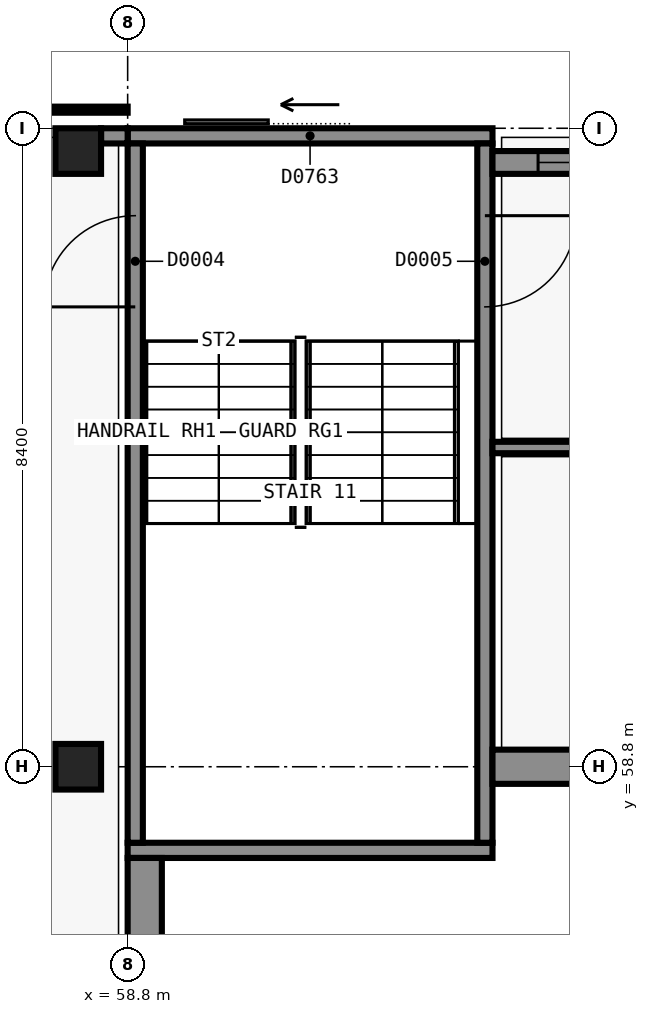
"""IFC4 building model, lengths in metres.
Left out: names, types, materials, properties, quantities, classifications, styles, units other than length and angle.
Written with IfcOpenShell. Run it as: python <this file> out.ifc"""

import sys

from ifc_helpers import new_model, si_unit, direction, frame, frame_2d, origin, origin_2d, place, context, subcontext, project, spatial, rectangle, extrude, element, fill, save


model = new_model("IFC4")
c1 = context("Model", 3, precision=1e-05, world=origin(), true_north=direction((0.0, 1.0)))
c2 = subcontext(c1, "Body", "Model", "MODEL_VIEW")
j1 = project(units=[si_unit("LENGTHUNIT", "METRE"), si_unit("PLANEANGLEUNIT", "RADIAN")], contexts=[c1])
p1 = place(None, origin())
s1 = spatial("IfcSite", under=j1, at=p1, CompositionType="ELEMENT")
p2 = place(p1, origin())
s2 = spatial("IfcBuilding", under=s1, at=p2, CompositionType="ELEMENT")
p3 = place(p2, origin())
s3 = spatial("IfcBuildingStorey", under=s2, at=p3, CompositionType="ELEMENT", Elevation=0.0)
p4 = place(p3, frame((63.6, 57.7, -0.3), z_axis=(0.0, 0.0, 1.0), x_axis=(-1.0, 0.0, 0.0)))
e1 = element("IfcWall", 1, at=p4, inside=s3, PredefinedType="SHEAR", context=c2, shape_type="SweptSolid", body=[
    extrude(rectangle(XDim=4.8, YDim=0.2, at=frame_2d((2.4, 0.0))), origin(), (0.0, 0.0, 1.0), 5.7),
])
p5 = place(p3, frame((58.8, 67.1, -0.3), z_axis=(0.0, 0.0, 1.0), x_axis=(1.0, 0.0, 0.0)))
e2 = element("IfcWall", 2, at=p5, inside=s3, PredefinedType="SHEAR", context=c2, shape_type="SweptSolid", body=[
    extrude(rectangle(XDim=4.8, YDim=0.2, at=frame_2d((2.4, 0.0))), origin(), (0.0, 0.0, 1.0), 5.7),
])
p6 = place(p5, frame((1.85, 0.0, 0.0)))
e3 = element("IfcOpeningElement", 3, at=p6, cuts=e2, PredefinedType="OPENING", context=c2, shape_type="SweptSolid", body=[
    extrude(rectangle(XDim=1.1, YDim=2.2, at=frame_2d((0.55, 1.1))), frame((0.0, 0.11, 0.0), z_axis=(0.0, -1.0, 0.0), x_axis=(1.0, 0.0, 0.0)), (0.0, 0.0, 1.0), 0.22),
])
p7 = place(p3, frame((58.9, 57.8, -0.3), z_axis=(0.0, 0.0, 1.0), x_axis=(0.0, 1.0, 0.0)))
e4 = element("IfcWall", 4, at=p7, inside=s3, PredefinedType="SHEAR", context=c2, shape_type="SweptSolid", body=[
    extrude(rectangle(XDim=9.2, YDim=0.2, at=frame_2d((4.6, 0.0))), origin(), (0.0, 0.0, 1.0), 5.7),
])
p8 = place(p7, frame((7.05, 0.0, 0.3)))
e5 = element("IfcOpeningElement", 5, at=p8, cuts=e4, PredefinedType="OPENING", context=c2, shape_type="SweptSolid", body=[
    extrude(rectangle(XDim=1.2, YDim=2.1, at=frame_2d((0.6, 1.05))), frame((0.0, 0.11, 0.0), z_axis=(0.0, -1.0, 0.0), x_axis=(1.0, 0.0, 0.0)), (0.0, 0.0, 1.0), 0.22),
])
p9 = place(p3, frame((63.5, 67.0, -0.3), z_axis=(0.0, 0.0, 1.0), x_axis=(0.0, -1.0, 0.0)))
e6 = element("IfcWall", 6, at=p9, inside=s3, PredefinedType="SHEAR", context=c2, shape_type="SweptSolid", body=[
    extrude(rectangle(XDim=9.2, YDim=0.2, at=frame_2d((4.6, 0.0))), origin(), (0.0, 0.0, 1.0), 5.7),
])
p10 = place(p9, frame((0.95, 0.0, 0.3)))
e7 = element("IfcOpeningElement", 7, at=p10, cuts=e6, PredefinedType="OPENING", context=c2, shape_type="SweptSolid", body=[
    extrude(rectangle(XDim=1.2, YDim=2.1, at=frame_2d((0.6, 1.05))), frame((0.0, 0.11, 0.0), z_axis=(0.0, -1.0, 0.0), x_axis=(1.0, 0.0, 0.0)), (0.0, 0.0, 1.0), 0.22),
])
p11 = place(p3, frame((63.6, 58.8, -0.3), z_axis=(0.0, 0.0, 1.0), x_axis=(1.0, 0.0, 0.0)))
e8 = element("IfcWall", 8, at=p11, inside=s3, PredefinedType="SHEAR", context=c2, shape_type="SweptSolid", body=[
    extrude(rectangle(XDim=20.625, YDim=0.45, at=frame_2d((10.312, 0.0))), origin(), (0.0, 0.0, 1.0), 5.7),
])
p12 = place(p11, frame((9.3, 0.0, 0.3)))
e9 = element("IfcOpeningElement", 9, at=p12, cuts=e8, PredefinedType="OPENING", context=c2, shape_type="SweptSolid", body=[
    extrude(rectangle(XDim=1.8, YDim=2.1, at=frame_2d((0.9, 1.05))), frame((0.0, 0.235, 0.0), z_axis=(0.0, -1.0, 0.0), x_axis=(1.0, 0.0, 0.0)), (0.0, 0.0, 1.0), 0.47),
])
p13 = place(p3, frame((59.025, 33.825, -0.3), z_axis=(0.0, 0.0, 1.0), x_axis=(0.0, 1.0, 0.0)))
e10 = element("IfcWall", 10, at=p13, inside=s3, PredefinedType="SHEAR", context=c2, shape_type="SweptSolid", body=[
    extrude(rectangle(XDim=23.775, YDim=0.45, at=frame_2d((11.888, 0.0))), origin(), (0.0, 0.0, 1.0), 5.7),
])
p14 = place(p13, frame((19.275, 0.0, 0.3)))
e11 = element("IfcOpeningElement", 11, at=p14, cuts=e10, PredefinedType="OPENING", context=c2, shape_type="SweptSolid", body=[
    extrude(rectangle(XDim=1.8, YDim=2.1, at=frame_2d((0.9, 1.05))), frame((0.0, 0.235, 0.0), z_axis=(0.0, -1.0, 0.0), x_axis=(1.0, 0.0, 0.0)), (0.0, 0.0, 1.0), 0.47),
])
for number, where, z_axis, x_axis in (
    (12, (58.15, 58.8, -0.3), (0.0, 0.0, 1.0), (1.0, 0.0, 0.0)),
    (13, (58.15, 66.9, -0.3), (0.0, 0.0, 1.0), (1.0, 0.0, 0.0)),
):
    element("IfcColumn", number, at=place(p3, frame(where, z_axis=z_axis, x_axis=x_axis)), inside=s3, PredefinedType="COLUMN", context=c2, shape_type="SweptSolid", body=[
        extrude(rectangle(XDim=0.6, YDim=0.6, at=origin_2d()), origin(), (0.0, 0.0, 1.0), 5.7),
    ])
p15 = place(p3, frame((58.45, 67.1, -0.3), z_axis=(0.0, 0.0, 1.0), x_axis=(1.0, 0.0, 0.0)))
e14 = element("IfcWall", 14, at=p15, inside=s3, PredefinedType="SHEAR", context=c2, shape_type="SweptSolid", body=[
    extrude(rectangle(XDim=0.35, YDim=0.2, at=frame_2d((0.175, 0.0))), origin(), (0.0, 0.0, 1.0), 5.7),
])
p16 = place(p3, frame((33.6, 67.445, 0.0), z_axis=(0.0, 0.0, 1.0), x_axis=(1.0, 0.0, 0.0)))
e15 = element("IfcWall", 15, at=p16, inside=s3, PredefinedType="MOVABLE", context=c2, shape_type="SweptSolid", body=[
    extrude(rectangle(XDim=25.2, YDim=0.08, at=frame_2d((12.6, 0.0))), origin(), (0.0, 0.0, 1.0), 3.0),
])
p17 = place(p16, frame((4.55, 0.0, 0.0)))
e16 = element("IfcOpeningElement", 16, at=p17, cuts=e15, PredefinedType="OPENING", context=c2, shape_type="SweptSolid", body=[
    extrude(rectangle(XDim=3.0, YDim=2.8, at=frame_2d((1.5, 1.4))), frame((0.0, 0.05, 0.0), z_axis=(0.0, -1.0, 0.0), x_axis=(1.0, 0.0, 0.0)), (0.0, 0.0, 1.0), 0.1),
])
p18 = place(p16, frame((8.85, 0.0, 0.0)))
e17 = element("IfcOpeningElement", 17, at=p18, cuts=e15, PredefinedType="OPENING", context=c2, shape_type="SweptSolid", body=[
    extrude(rectangle(XDim=3.0, YDim=2.8, at=frame_2d((1.5, 1.4))), frame((0.0, 0.05, 0.0), z_axis=(0.0, -1.0, 0.0), x_axis=(1.0, 0.0, 0.0)), (0.0, 0.0, 1.0), 0.1),
])
p19 = place(p16, frame((12.15, 0.0, 0.0)))
e18 = element("IfcOpeningElement", 18, at=p19, cuts=e15, PredefinedType="OPENING", context=c2, shape_type="SweptSolid", body=[
    extrude(rectangle(XDim=3.0, YDim=2.8, at=frame_2d((1.5, 1.4))), frame((0.0, 0.05, 0.0), z_axis=(0.0, -1.0, 0.0), x_axis=(1.0, 0.0, 0.0)), (0.0, 0.0, 1.0), 0.1),
])
p20 = place(p16, frame((17.25, 0.0, 0.0)))
e19 = element("IfcOpeningElement", 19, at=p20, cuts=e15, PredefinedType="OPENING", context=c2, shape_type="SweptSolid", body=[
    extrude(rectangle(XDim=3.0, YDim=2.8, at=frame_2d((1.5, 1.4))), frame((0.0, 0.05, 0.0), z_axis=(0.0, -1.0, 0.0), x_axis=(1.0, 0.0, 0.0)), (0.0, 0.0, 1.0), 0.1),
])
p21 = place(p16, frame((20.55, 0.0, 0.0)))
e20 = element("IfcOpeningElement", 20, at=p21, cuts=e15, PredefinedType="OPENING", context=c2, shape_type="SweptSolid", body=[
    extrude(rectangle(XDim=1.8, YDim=2.4, at=frame_2d((0.9, 1.2))), frame((0.0, 0.05, 0.0), z_axis=(0.0, -1.0, 0.0), x_axis=(1.0, 0.0, 0.0)), (0.0, 0.0, 1.0), 0.1),
])
p22 = place(p3, frame((63.6, 66.75, 0.0), z_axis=(0.0, 0.0, 1.0), x_axis=(1.0, 0.0, 0.0)))
e21 = element("IfcWall", 21, at=p22, inside=s3, PredefinedType="SOLIDWALL", context=c2, shape_type="SweptSolid", body=[
    extrude(rectangle(XDim=32.4, YDim=0.3, at=frame_2d((16.2, 0.0))), origin(), (0.0, 0.0, 1.0), 5.1),
])
p23 = place(p22, frame((14.4, 0.0, 0.0)))
e22 = element("IfcOpeningElement", 22, at=p23, cuts=e21, PredefinedType="OPENING", context=c2, shape_type="SweptSolid", body=[
    extrude(rectangle(XDim=3.6, YDim=3.0, at=frame_2d((1.8, 1.5))), frame((0.0, 0.16, 0.0), z_axis=(0.0, -1.0, 0.0), x_axis=(1.0, 0.0, 0.0)), (0.0, 0.0, 1.0), 0.32),
])
p24 = place(p22, frame((22.8, 0.0, 0.0)))
e23 = element("IfcOpeningElement", 23, at=p24, cuts=e21, PredefinedType="OPENING", context=c2, shape_type="SweptSolid", body=[
    extrude(rectangle(XDim=3.6, YDim=3.0, at=frame_2d((1.8, 1.5))), frame((0.0, 0.16, 0.0), z_axis=(0.0, -1.0, 0.0), x_axis=(1.0, 0.0, 0.0)), (0.0, 0.0, 1.0), 0.32),
])
p25 = place(p22, frame((0.6, 0.0, 0.9)))
e24 = element("IfcOpeningElement", 24, at=p25, cuts=e21, PredefinedType="OPENING", context=c2, shape_type="SweptSolid", body=[
    extrude(rectangle(XDim=1.8, YDim=1.5, at=frame_2d((0.9, 0.75))), frame((0.0, 0.16, 0.0), z_axis=(0.0, -1.0, 0.0), x_axis=(1.0, 0.0, 0.0)), (0.0, 0.0, 1.0), 0.32),
])
p26 = place(p22, frame((5.1, 0.0, 0.9)))
e25 = element("IfcOpeningElement", 25, at=p26, cuts=e21, PredefinedType="OPENING", context=c2, shape_type="SweptSolid", body=[
    extrude(rectangle(XDim=1.2, YDim=1.8, at=frame_2d((0.6, 0.9))), frame((0.0, 0.16, 0.0), z_axis=(0.0, -1.0, 0.0), x_axis=(1.0, 0.0, 0.0)), (0.0, 0.0, 1.0), 0.32),
])
p27 = place(p22, frame((9.3, 0.0, 0.9)))
e26 = element("IfcOpeningElement", 26, at=p27, cuts=e21, PredefinedType="OPENING", context=c2, shape_type="SweptSolid", body=[
    extrude(rectangle(XDim=1.2, YDim=1.8, at=frame_2d((0.6, 0.9))), frame((0.0, 0.16, 0.0), z_axis=(0.0, -1.0, 0.0), x_axis=(1.0, 0.0, 0.0)), (0.0, 0.0, 1.0), 0.32),
])
p28 = place(p22, frame((30.0, 0.0, 0.9)))
e27 = element("IfcOpeningElement", 27, at=p28, cuts=e21, PredefinedType="OPENING", context=c2, shape_type="SweptSolid", body=[
    extrude(rectangle(XDim=1.8, YDim=1.5, at=frame_2d((0.9, 0.75))), frame((0.0, 0.16, 0.0), z_axis=(0.0, -1.0, 0.0), x_axis=(1.0, 0.0, 0.0)), (0.0, 0.0, 1.0), 0.32),
])
p29 = place(p3, frame((63.6, 63.0, 0.0), z_axis=(0.0, 0.0, 1.0), x_axis=(1.0, 0.0, 0.0)))
e28 = element("IfcWall", 28, at=p29, inside=s3, PredefinedType="PARTITIONING", context=c2, shape_type="SweptSolid", body=[
    extrude(rectangle(XDim=3.5, YDim=0.15, at=frame_2d((1.75, 0.0))), origin(), (0.0, 0.0, 1.0), 4.4),
])
p30 = place(p29, frame((1.3, 0.0, 0.0)))
e29 = element("IfcOpeningElement", 29, at=p30, cuts=e28, PredefinedType="OPENING", context=c2, shape_type="SweptSolid", body=[
    extrude(rectangle(XDim=1.0, YDim=2.1, at=frame_2d((0.5, 1.05))), frame((0.0, 0.085, 0.0), z_axis=(0.0, -1.0, 0.0), x_axis=(1.0, 0.0, 0.0)), (0.0, 0.0, 1.0), 0.17),
])
p31 = place(p6, origin())
e30 = element("IfcDoor", 30, at=p31, inside=s3, OperationType="SLIDING_TO_LEFT", PredefinedType="DOOR", context=c2, shape_type="SweptSolid", body=[
    extrude(rectangle(XDim=1.1, YDim=2.2, at=frame_2d((0.55, 1.1))), frame((0.0, 0.025, 0.0), z_axis=(0.0, -1.0, 0.0), x_axis=(1.0, 0.0, 0.0)), (0.0, 0.0, 1.0), 0.05),
])
fill(e3, e30)
p32 = place(p25, origin())
e31 = element("IfcWindow", 31, at=p32, inside=s3, PartitioningType="SINGLE_PANEL", PredefinedType="WINDOW", context=c2, shape_type="SweptSolid", body=[
    extrude(rectangle(XDim=1.8, YDim=1.5, at=frame_2d((0.9, 0.75))), frame((0.0, 0.03, 0.0), z_axis=(0.0, -1.0, 0.0), x_axis=(1.0, 0.0, 0.0)), (0.0, 0.0, 1.0), 0.06),
])
fill(e24, e31)
p33 = place(p8, origin())
e32 = element("IfcDoor", 32, at=p33, inside=s3, OperationType="SINGLE_SWING_RIGHT", PredefinedType="DOOR", context=c2, shape_type="SweptSolid", body=[
    extrude(rectangle(XDim=1.2, YDim=2.1, at=frame_2d((0.6, 1.05))), frame((0.0, 0.025, 0.0), z_axis=(0.0, -1.0, 0.0), x_axis=(1.0, 0.0, 0.0)), (0.0, 0.0, 1.0), 0.05),
])
fill(e5, e32)
p34 = place(p10, origin())
e33 = element("IfcDoor", 33, at=p34, inside=s3, OperationType="SINGLE_SWING_RIGHT", PredefinedType="DOOR", context=c2, shape_type="SweptSolid", body=[
    extrude(rectangle(XDim=1.2, YDim=2.1, at=frame_2d((0.6, 1.05))), frame((0.0, 0.025, 0.0), z_axis=(0.0, -1.0, 0.0), x_axis=(1.0, 0.0, 0.0)), (0.0, 0.0, 1.0), 0.05),
])
fill(e7, e33)
save(model, sys.argv[1])
